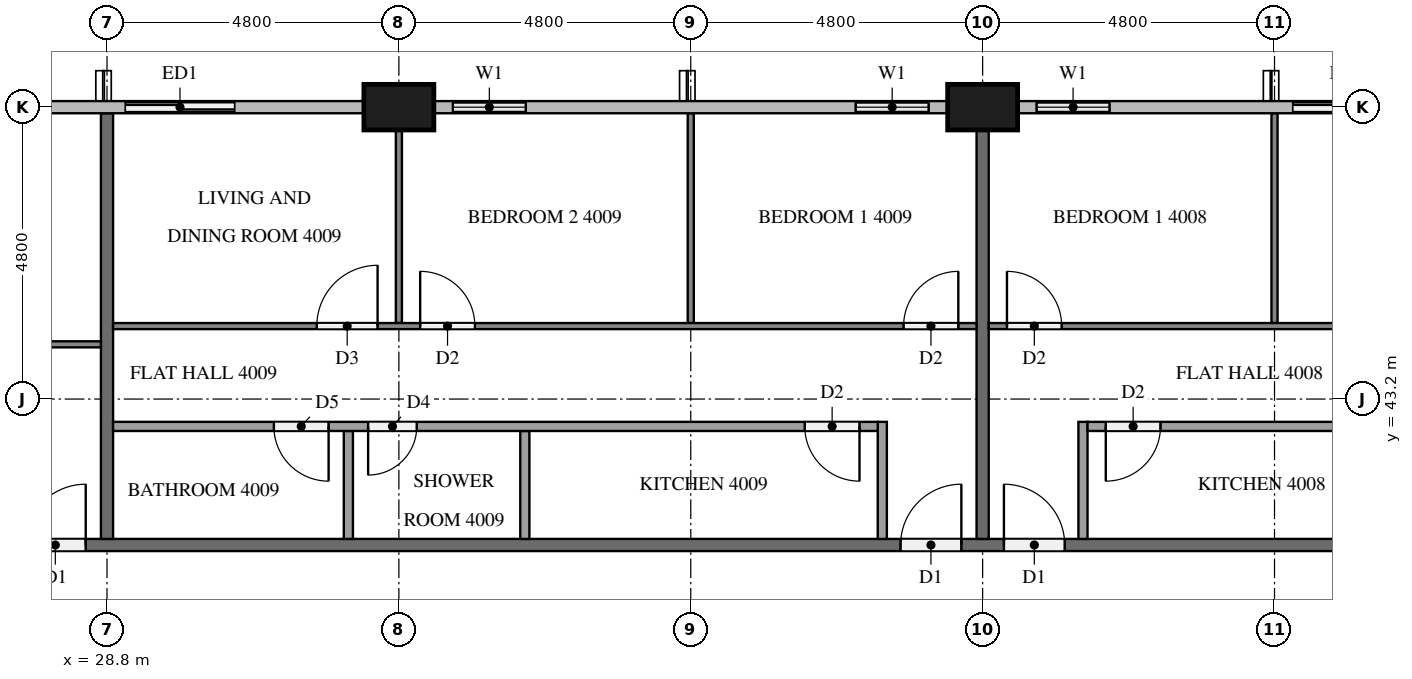
"""IFC4 building model, lengths in metres.
Left out: names, types, materials, properties, quantities, classifications, styles, units other than length and angle.
Written with IfcOpenShell. Run it as: python <this file> out.ifc"""

import sys

from ifc_helpers import new_model, si_unit, direction, frame, frame_2d, origin, origin_2d, place, context, subcontext, project, spatial, rectangle, extrude, element, fill, save


model = new_model("IFC4")
c1 = context("Model", 3, precision=1e-05, world=origin(), true_north=direction((0.0, 1.0)))
c2 = subcontext(c1, "Body", "Model", "MODEL_VIEW")
j1 = project(units=[si_unit("LENGTHUNIT", "METRE"), si_unit("PLANEANGLEUNIT", "RADIAN")], contexts=[c1])
p1 = place(None, origin())
s1 = spatial("IfcSite", under=j1, at=p1, CompositionType="ELEMENT")
p2 = place(p1, origin())
s2 = spatial("IfcBuilding", under=s1, at=p2, CompositionType="ELEMENT")
p3 = place(p2, frame((0.0, 0.0, 156.0)))
s3 = spatial("IfcBuildingStorey", under=s2, at=p3, CompositionType="ELEMENT", Elevation=156.0)
for number, where, z_axis, x_axis in (
    (1, (43.2, 48.0, 0.0), (0.0, 0.0, 1.0), (1.0, 0.0, 0.0)),
    (2, (33.6, 48.0, 0.0), (0.0, 0.0, 1.0), (1.0, 0.0, 0.0)),
):
    element("IfcColumn", number, at=place(p3, frame(where, z_axis=z_axis, x_axis=x_axis)), inside=s3, PredefinedType="COLUMN", context=c2, shape_type="SweptSolid", body=[
        extrude(rectangle(XDim=1.15, YDim=0.75, at=origin_2d()), origin(), (0.0, 0.0, 1.0), 3.2),
    ])
p4 = place(p3, frame((50.4, 48.0, 0.0), z_axis=(0.0, 0.0, 1.0), x_axis=(-1.0, 0.0, 0.0)))
e3 = element("IfcWall", 3, at=p4, inside=s3, PredefinedType="SOLIDWALL", context=c2, shape_type="SweptSolid", body=[
    extrude(rectangle(XDim=2.4, YDim=0.15, at=frame_2d((1.2, 0.0))), origin(), (0.0, 0.0, 1.0), 3.2),
])
p5 = place(p4, frame((0.3, 0.0, 0.0)))
e4 = element("IfcOpeningElement", 4, at=p5, cuts=e3, PredefinedType="OPENING", context=c2, shape_type="SweptSolid", body=[
    extrude(rectangle(XDim=1.8, YDim=2.4, at=frame_2d((0.9, 1.2))), frame((0.0, 0.085, 0.0), z_axis=(0.0, -1.0, 0.0), x_axis=(1.0, 0.0, 0.0)), (0.0, 0.0, 1.0), 0.17),
])
p6 = place(p3, frame((45.6, 48.0, 0.0), z_axis=(0.0, 0.0, 1.0), x_axis=(-1.0, 0.0, 0.0)))
e5 = element("IfcWall", 5, at=p6, inside=s3, PredefinedType="SOLIDWALL", context=c2, shape_type="SweptSolid", body=[
    extrude(rectangle(XDim=1.825, YDim=0.15, at=frame_2d((0.913, 0.0))), origin(), (0.0, 0.0, 1.0), 3.2),
])
p7 = place(p6, frame((0.312, 0.0, 0.9)))
e6 = element("IfcOpeningElement", 6, at=p7, cuts=e5, PredefinedType="OPENING", context=c2, shape_type="SweptSolid", body=[
    extrude(rectangle(XDim=1.2, YDim=1.4, at=frame_2d((0.6, 0.7))), frame((0.0, 0.085, 0.0), z_axis=(0.0, -1.0, 0.0), x_axis=(1.0, 0.0, 0.0)), (0.0, 0.0, 1.0), 0.17),
])
p8 = place(p3, frame((42.625, 48.0, 0.0), z_axis=(0.0, 0.0, 1.0), x_axis=(-1.0, 0.0, 0.0)))
e7 = element("IfcWall", 7, at=p8, inside=s3, PredefinedType="SOLIDWALL", context=c2, shape_type="SweptSolid", body=[
    extrude(rectangle(XDim=1.825, YDim=0.15, at=frame_2d((0.913, 0.0))), origin(), (0.0, 0.0, 1.0), 3.2),
])
p9 = place(p8, frame((0.312, 0.0, 0.9)))
e8 = element("IfcOpeningElement", 8, at=p9, cuts=e7, PredefinedType="OPENING", context=c2, shape_type="SweptSolid", body=[
    extrude(rectangle(XDim=1.2, YDim=1.4, at=frame_2d((0.6, 0.7))), frame((0.0, 0.085, 0.0), z_axis=(0.0, -1.0, 0.0), x_axis=(1.0, 0.0, 0.0)), (0.0, 0.0, 1.0), 0.17),
])
p10 = place(p3, frame((36.0, 48.0, 0.0), z_axis=(0.0, 0.0, 1.0), x_axis=(-1.0, 0.0, 0.0)))
e9 = element("IfcWall", 9, at=p10, inside=s3, PredefinedType="SOLIDWALL", context=c2, shape_type="SweptSolid", body=[
    extrude(rectangle(XDim=1.825, YDim=0.15, at=frame_2d((0.913, 0.0))), origin(), (0.0, 0.0, 1.0), 3.2),
])
p11 = place(p10, frame((0.312, 0.0, 0.9)))
e10 = element("IfcOpeningElement", 10, at=p11, cuts=e9, PredefinedType="OPENING", context=c2, shape_type="SweptSolid", body=[
    extrude(rectangle(XDim=1.2, YDim=1.4, at=frame_2d((0.6, 0.7))), frame((0.0, 0.085, 0.0), z_axis=(0.0, -1.0, 0.0), x_axis=(1.0, 0.0, 0.0)), (0.0, 0.0, 1.0), 0.17),
])
p12 = place(p3, frame((31.2, 48.0, 0.0), z_axis=(0.0, 0.0, 1.0), x_axis=(-1.0, 0.0, 0.0)))
e11 = element("IfcWall", 11, at=p12, inside=s3, PredefinedType="SOLIDWALL", context=c2, shape_type="SweptSolid", body=[
    extrude(rectangle(XDim=2.4, YDim=0.15, at=frame_2d((1.2, 0.0))), origin(), (0.0, 0.0, 1.0), 3.2),
])
p13 = place(p12, frame((0.3, 0.0, 0.0)))
e12 = element("IfcOpeningElement", 12, at=p13, cuts=e11, PredefinedType="OPENING", context=c2, shape_type="SweptSolid", body=[
    extrude(rectangle(XDim=1.8, YDim=2.4, at=frame_2d((0.9, 1.2))), frame((0.0, 0.085, 0.0), z_axis=(0.0, -1.0, 0.0), x_axis=(1.0, 0.0, 0.0)), (0.0, 0.0, 1.0), 0.17),
])
p14 = place(p3, frame((11.9, 40.8, 0.0), z_axis=(0.0, 0.0, 1.0), x_axis=(1.0, 0.0, 0.0)))
e13 = element("IfcWall", 13, at=p14, inside=s3, PredefinedType="PARTITIONING", context=c2, shape_type="SweptSolid", body=[
    extrude(rectangle(XDim=38.6, YDim=0.2, at=frame_2d((19.3, 0.0))), origin(), (0.0, 0.0, 1.0), 3.2),
])
p15 = place(p14, frame((31.65, 0.0, 0.0)))
e14 = element("IfcOpeningElement", 14, at=p15, cuts=e13, PredefinedType="OPENING", context=c2, shape_type="SweptSolid", body=[
    extrude(rectangle(XDim=1.0, YDim=2.1, at=frame_2d((0.5, 1.05))), frame((0.0, 0.11, 0.0), z_axis=(0.0, -1.0, 0.0), x_axis=(1.0, 0.0, 0.0)), (0.0, 0.0, 1.0), 0.22),
])
p16 = place(p14, frame((29.95, 0.0, 0.0)))
e15 = element("IfcOpeningElement", 15, at=p16, cuts=e13, PredefinedType="OPENING", context=c2, shape_type="SweptSolid", body=[
    extrude(rectangle(XDim=1.0, YDim=2.1, at=frame_2d((0.5, 1.05))), frame((0.0, 0.11, 0.0), z_axis=(0.0, -1.0, 0.0), x_axis=(1.0, 0.0, 0.0)), (0.0, 0.0, 1.0), 0.22),
])
p17 = place(p14, frame((15.55, 0.0, 0.0)))
e16 = element("IfcOpeningElement", 16, at=p17, cuts=e13, PredefinedType="OPENING", context=c2, shape_type="SweptSolid", body=[
    extrude(rectangle(XDim=1.0, YDim=2.1, at=frame_2d((0.5, 1.05))), frame((0.0, 0.11, 0.0), z_axis=(0.0, -1.0, 0.0), x_axis=(1.0, 0.0, 0.0)), (0.0, 0.0, 1.0), 0.22),
])
p18 = place(p14, frame((1.15, 0.0, 0.0)))
e17 = element("IfcOpeningElement", 17, at=p18, cuts=e13, PredefinedType="OPENING", context=c2, shape_type="SweptSolid", body=[
    extrude(rectangle(XDim=1.0, YDim=2.1, at=frame_2d((0.5, 1.05))), frame((0.0, 0.11, 0.0), z_axis=(0.0, -1.0, 0.0), x_axis=(1.0, 0.0, 0.0)), (0.0, 0.0, 1.0), 0.22),
])
p19 = place(p3, frame((43.2, 47.625, 0.0), z_axis=(0.0, 0.0, 1.0), x_axis=(0.0, -1.0, 0.0)))
e18 = element("IfcWall", 18, at=p19, inside=s3, PredefinedType="PARTITIONING", context=c2, shape_type="SweptSolid", body=[
    extrude(rectangle(XDim=6.725, YDim=0.2, at=frame_2d((3.363, 0.0))), origin(), (0.0, 0.0, 1.0), 3.2),
])
p20 = place(p3, frame((28.8, 47.9, 0.0), z_axis=(0.0, 0.0, 1.0), x_axis=(0.0, -1.0, 0.0)))
e19 = element("IfcWall", 19, at=p20, inside=s3, PredefinedType="PARTITIONING", context=c2, shape_type="SweptSolid", body=[
    extrude(rectangle(XDim=7.0, YDim=0.2, at=frame_2d((3.5, 0.0))), origin(), (0.0, 0.0, 1.0), 3.2),
])
p21 = place(p3, frame((48.0, 44.45, 0.0), z_axis=(0.0, 0.0, 1.0), x_axis=(0.0, 1.0, 0.0)))
e20 = element("IfcWall", 20, at=p21, inside=s3, PredefinedType="PARTITIONING", context=c2, shape_type="SweptSolid", body=[
    extrude(rectangle(XDim=3.45, YDim=0.1, at=frame_2d((1.725, 0.0))), origin(), (0.0, 0.0, 1.0), 3.2),
])
p22 = place(p3, frame((43.3, 44.4, 0.0), z_axis=(0.0, 0.0, 1.0), x_axis=(1.0, 0.0, 0.0)))
e21 = element("IfcWall", 21, at=p22, inside=s3, PredefinedType="PARTITIONING", context=c2, shape_type="SweptSolid", body=[
    extrude(rectangle(XDim=13.878, YDim=0.1, at=frame_2d((6.939, 0.0))), origin(), (0.0, 0.0, 1.0), 3.2),
])
p23 = place(p22, frame((0.3, 0.0, 0.0)))
e22 = element("IfcOpeningElement", 22, at=p23, cuts=e21, PredefinedType="OPENING", context=c2, shape_type="SweptSolid", body=[
    extrude(rectangle(XDim=0.9, YDim=2.1, at=frame_2d((0.45, 1.05))), frame((0.0, 0.06, 0.0), z_axis=(0.0, -1.0, 0.0), x_axis=(1.0, 0.0, 0.0)), (0.0, 0.0, 1.0), 0.12),
])
p24 = place(p22, frame((8.15, 0.0, 0.0)))
e23 = element("IfcOpeningElement", 23, at=p24, cuts=e21, PredefinedType="OPENING", context=c2, shape_type="SweptSolid", body=[
    extrude(rectangle(XDim=1.0, YDim=2.1, at=frame_2d((0.5, 1.05))), frame((0.0, 0.06, 0.0), z_axis=(0.0, -1.0, 0.0), x_axis=(1.0, 0.0, 0.0)), (0.0, 0.0, 1.0), 0.12),
])
p25 = place(p22, frame((9.85, 0.0, 0.0)))
e24 = element("IfcOpeningElement", 24, at=p25, cuts=e21, PredefinedType="OPENING", context=c2, shape_type="SweptSolid", body=[
    extrude(rectangle(XDim=0.9, YDim=2.1, at=frame_2d((0.45, 1.05))), frame((0.0, 0.06, 0.0), z_axis=(0.0, -1.0, 0.0), x_axis=(1.0, 0.0, 0.0)), (0.0, 0.0, 1.0), 0.12),
])
p26 = place(p3, frame((44.85, 40.9, 0.0), z_axis=(0.0, 0.0, 1.0), x_axis=(0.0, 1.0, 0.0)))
e25 = element("IfcWall", 25, at=p26, inside=s3, PredefinedType="PARTITIONING", context=c2, shape_type="SweptSolid", body=[
    extrude(rectangle(XDim=1.925, YDim=0.15, at=frame_2d((0.962, 0.0))), origin(), (0.0, 0.0, 1.0), 3.2),
])
p27 = place(p3, frame((57.075, 42.75, 0.0), z_axis=(0.0, 0.0, 1.0), x_axis=(-1.0, 0.0, 0.0)))
e26 = element("IfcWall", 26, at=p27, inside=s3, PredefinedType="PARTITIONING", context=c2, shape_type="SweptSolid", body=[
    extrude(rectangle(XDim=12.15, YDim=0.15, at=frame_2d((6.075, 0.0))), origin(), (0.0, 0.0, 1.0), 3.2),
])
p28 = place(p27, frame((10.95, 0.0, 0.0)))
e27 = element("IfcOpeningElement", 27, at=p28, cuts=e26, PredefinedType="OPENING", context=c2, shape_type="SweptSolid", body=[
    extrude(rectangle(XDim=0.9, YDim=2.1, at=frame_2d((0.45, 1.05))), frame((0.0, 0.085, 0.0), z_axis=(0.0, -1.0, 0.0), x_axis=(1.0, 0.0, 0.0)), (0.0, 0.0, 1.0), 0.17),
])
p29 = place(p27, frame((3.769, 0.0, 0.0)))
e28 = element("IfcOpeningElement", 28, at=p29, cuts=e26, PredefinedType="OPENING", context=c2, shape_type="SweptSolid", body=[
    extrude(rectangle(XDim=0.8, YDim=2.1, at=frame_2d((0.4, 1.05))), frame((0.0, 0.085, 0.0), z_axis=(0.0, -1.0, 0.0), x_axis=(1.0, 0.0, 0.0)), (0.0, 0.0, 1.0), 0.17),
])
p30 = place(p27, frame((2.219, 0.0, 0.0)))
e29 = element("IfcOpeningElement", 29, at=p30, cuts=e26, PredefinedType="OPENING", context=c2, shape_type="SweptSolid", body=[
    extrude(rectangle(XDim=0.9, YDim=2.1, at=frame_2d((0.45, 1.05))), frame((0.0, 0.085, 0.0), z_axis=(0.0, -1.0, 0.0), x_axis=(1.0, 0.0, 0.0)), (0.0, 0.0, 1.0), 0.17),
])
p31 = place(p3, frame((38.4, 44.45, 0.0), z_axis=(0.0, 0.0, 1.0), x_axis=(0.0, 1.0, 0.0)))
e30 = element("IfcWall", 30, at=p31, inside=s3, PredefinedType="PARTITIONING", context=c2, shape_type="SweptSolid", body=[
    extrude(rectangle(XDim=3.45, YDim=0.1, at=frame_2d((1.725, 0.0))), origin(), (0.0, 0.0, 1.0), 3.2),
])
p32 = place(p3, frame((33.6, 44.45, 0.0), z_axis=(0.0, 0.0, 1.0), x_axis=(0.0, 1.0, 0.0)))
e31 = element("IfcWall", 31, at=p32, inside=s3, PredefinedType="PARTITIONING", context=c2, shape_type="SweptSolid", body=[
    extrude(rectangle(XDim=3.175, YDim=0.1, at=frame_2d((1.587, 0.0))), origin(), (0.0, 0.0, 1.0), 3.2),
])
p33 = place(p3, frame((28.9, 44.4, 0.0), z_axis=(0.0, 0.0, 1.0), x_axis=(1.0, 0.0, 0.0)))
e32 = element("IfcWall", 32, at=p33, inside=s3, PredefinedType="PARTITIONING", context=c2, shape_type="SweptSolid", body=[
    extrude(rectangle(XDim=14.2, YDim=0.1, at=frame_2d((7.1, 0.0))), origin(), (0.0, 0.0, 1.0), 3.2),
])
p34 = place(p33, frame((13.0, 0.0, 0.0)))
e33 = element("IfcOpeningElement", 33, at=p34, cuts=e32, PredefinedType="OPENING", context=c2, shape_type="SweptSolid", body=[
    extrude(rectangle(XDim=0.9, YDim=2.1, at=frame_2d((0.45, 1.05))), frame((0.0, 0.06, 0.0), z_axis=(0.0, -1.0, 0.0), x_axis=(1.0, 0.0, 0.0)), (0.0, 0.0, 1.0), 0.12),
])
p35 = place(p33, frame((5.05, 0.0, 0.0)))
e34 = element("IfcOpeningElement", 34, at=p35, cuts=e32, PredefinedType="OPENING", context=c2, shape_type="SweptSolid", body=[
    extrude(rectangle(XDim=0.9, YDim=2.1, at=frame_2d((0.45, 1.05))), frame((0.0, 0.06, 0.0), z_axis=(0.0, -1.0, 0.0), x_axis=(1.0, 0.0, 0.0)), (0.0, 0.0, 1.0), 0.12),
])
p36 = place(p33, frame((3.35, 0.0, 0.0)))
e35 = element("IfcOpeningElement", 35, at=p36, cuts=e32, PredefinedType="OPENING", context=c2, shape_type="SweptSolid", body=[
    extrude(rectangle(XDim=1.0, YDim=2.1, at=frame_2d((0.5, 1.05))), frame((0.0, 0.06, 0.0), z_axis=(0.0, -1.0, 0.0), x_axis=(1.0, 0.0, 0.0)), (0.0, 0.0, 1.0), 0.12),
])
for number, where, z_axis, x_axis in (
    (36, (35.671, 40.9, 0.0), (0.0, 0.0, 1.0), (0.0, 1.0, 0.0)),
    (37, (32.769, 40.9, 0.0), (0.0, 0.0, 1.0), (0.0, 1.0, 0.0)),
):
    element("IfcWall", number, at=place(p3, frame(where, z_axis=z_axis, x_axis=x_axis)), inside=s3, PredefinedType="PARTITIONING", context=c2, shape_type="SweptSolid", body=[
        extrude(rectangle(XDim=1.775, YDim=0.15, at=frame_2d((0.888, 0.0))), origin(), (0.0, 0.0, 1.0), 3.2),
    ])
p37 = place(p3, frame((41.55, 40.9, 0.0), z_axis=(0.0, 0.0, 1.0), x_axis=(0.0, 1.0, 0.0)))
e38 = element("IfcWall", 38, at=p37, inside=s3, PredefinedType="PARTITIONING", context=c2, shape_type="SweptSolid", body=[
    extrude(rectangle(XDim=1.925, YDim=0.15, at=frame_2d((0.962, 0.0))), origin(), (0.0, 0.0, 1.0), 3.2),
])
p38 = place(p3, frame((41.475, 42.75, 0.0), z_axis=(0.0, 0.0, 1.0), x_axis=(-1.0, 0.0, 0.0)))
e39 = element("IfcWall", 39, at=p38, inside=s3, PredefinedType="PARTITIONING", context=c2, shape_type="SweptSolid", body=[
    extrude(rectangle(XDim=12.575, YDim=0.15, at=frame_2d((6.288, 0.0))), origin(), (0.0, 0.0, 1.0), 3.2),
])
p39 = place(p38, frame((0.3, 0.0, 0.0)))
e40 = element("IfcOpeningElement", 40, at=p39, cuts=e39, PredefinedType="OPENING", context=c2, shape_type="SweptSolid", body=[
    extrude(rectangle(XDim=0.9, YDim=2.1, at=frame_2d((0.45, 1.05))), frame((0.0, 0.085, 0.0), z_axis=(0.0, -1.0, 0.0), x_axis=(1.0, 0.0, 0.0)), (0.0, 0.0, 1.0), 0.17),
])
p40 = place(p38, frame((7.581, 0.0, 0.0)))
e41 = element("IfcOpeningElement", 41, at=p40, cuts=e39, PredefinedType="OPENING", context=c2, shape_type="SweptSolid", body=[
    extrude(rectangle(XDim=0.8, YDim=2.1, at=frame_2d((0.4, 1.05))), frame((0.0, 0.085, 0.0), z_axis=(0.0, -1.0, 0.0), x_axis=(1.0, 0.0, 0.0)), (0.0, 0.0, 1.0), 0.17),
])
p41 = place(p38, frame((9.031, 0.0, 0.0)))
e42 = element("IfcOpeningElement", 42, at=p41, cuts=e39, PredefinedType="OPENING", context=c2, shape_type="SweptSolid", body=[
    extrude(rectangle(XDim=0.9, YDim=2.1, at=frame_2d((0.45, 1.05))), frame((0.0, 0.085, 0.0), z_axis=(0.0, -1.0, 0.0), x_axis=(1.0, 0.0, 0.0)), (0.0, 0.0, 1.0), 0.17),
])
p42 = place(p3, frame((14.5, 44.1, 0.0), z_axis=(0.0, 0.0, 1.0), x_axis=(1.0, 0.0, 0.0)))
e43 = element("IfcWall", 43, at=p42, inside=s3, PredefinedType="PARTITIONING", context=c2, shape_type="SweptSolid", body=[
    extrude(rectangle(XDim=14.2, YDim=0.1, at=frame_2d((7.1, 0.0))), origin(), (0.0, 0.0, 1.0), 3.2),
])
p43 = place(p42, frame((9.85, 0.0, 0.0)))
e44 = element("IfcOpeningElement", 44, at=p43, cuts=e43, PredefinedType="OPENING", context=c2, shape_type="SweptSolid", body=[
    extrude(rectangle(XDim=0.9, YDim=2.1, at=frame_2d((0.45, 1.05))), frame((0.0, 0.06, 0.0), z_axis=(0.0, -1.0, 0.0), x_axis=(1.0, 0.0, 0.0)), (0.0, 0.0, 1.0), 0.12),
])
p44 = place(p42, frame((8.25, 0.0, 0.0)))
e45 = element("IfcOpeningElement", 45, at=p44, cuts=e43, PredefinedType="OPENING", context=c2, shape_type="SweptSolid", body=[
    extrude(rectangle(XDim=0.9, YDim=2.1, at=frame_2d((0.45, 1.05))), frame((0.0, 0.06, 0.0), z_axis=(0.0, -1.0, 0.0), x_axis=(1.0, 0.0, 0.0)), (0.0, 0.0, 1.0), 0.12),
])
p45 = place(p42, frame((0.3, 0.0, 0.0)))
e46 = element("IfcOpeningElement", 46, at=p45, cuts=e43, PredefinedType="OPENING", context=c2, shape_type="SweptSolid", body=[
    extrude(rectangle(XDim=1.0, YDim=2.1, at=frame_2d((0.5, 1.05))), frame((0.0, 0.06, 0.0), z_axis=(0.0, -1.0, 0.0), x_axis=(1.0, 0.0, 0.0)), (0.0, 0.0, 1.0), 0.12),
])
p46 = place(p5, origin())
e47 = element("IfcDoor", 47, at=p46, inside=s3, OperationType="SLIDING_TO_RIGHT", PredefinedType="DOOR", context=c2, shape_type="SweptSolid", body=[
    extrude(rectangle(XDim=1.8, YDim=2.4, at=frame_2d((0.9, 1.2))), frame((0.0, 0.025, 0.0), z_axis=(0.0, -1.0, 0.0), x_axis=(1.0, 0.0, 0.0)), (0.0, 0.0, 1.0), 0.05),
])
fill(e4, e47)
p47 = place(p7, origin())
e48 = element("IfcWindow", 48, at=p47, inside=s3, PartitioningType="SINGLE_PANEL", PredefinedType="WINDOW", context=c2, shape_type="SweptSolid", body=[
    extrude(rectangle(XDim=1.2, YDim=1.4, at=frame_2d((0.6, 0.7))), frame((0.0, 0.03, 0.0), z_axis=(0.0, -1.0, 0.0), x_axis=(1.0, 0.0, 0.0)), (0.0, 0.0, 1.0), 0.06),
])
fill(e6, e48)
p48 = place(p9, origin())
e49 = element("IfcWindow", 49, at=p48, inside=s3, PartitioningType="SINGLE_PANEL", PredefinedType="WINDOW", context=c2, shape_type="SweptSolid", body=[
    extrude(rectangle(XDim=1.2, YDim=1.4, at=frame_2d((0.6, 0.7))), frame((0.0, 0.03, 0.0), z_axis=(0.0, -1.0, 0.0), x_axis=(1.0, 0.0, 0.0)), (0.0, 0.0, 1.0), 0.06),
])
fill(e8, e49)
p49 = place(p11, origin())
e50 = element("IfcWindow", 50, at=p49, inside=s3, PartitioningType="SINGLE_PANEL", PredefinedType="WINDOW", context=c2, shape_type="SweptSolid", body=[
    extrude(rectangle(XDim=1.2, YDim=1.4, at=frame_2d((0.6, 0.7))), frame((0.0, 0.03, 0.0), z_axis=(0.0, -1.0, 0.0), x_axis=(1.0, 0.0, 0.0)), (0.0, 0.0, 1.0), 0.06),
])
fill(e10, e50)
p50 = place(p13, origin())
e51 = element("IfcDoor", 51, at=p50, inside=s3, OperationType="SLIDING_TO_LEFT", PredefinedType="DOOR", context=c2, shape_type="SweptSolid", body=[
    extrude(rectangle(XDim=1.8, YDim=2.4, at=frame_2d((0.9, 1.2))), frame((0.0, 0.025, 0.0), z_axis=(0.0, -1.0, 0.0), x_axis=(1.0, 0.0, 0.0)), (0.0, 0.0, 1.0), 0.05),
])
fill(e12, e51)
p51 = place(p15, origin())
e52 = element("IfcDoor", 52, at=p51, inside=s3, OperationType="SINGLE_SWING_LEFT", PredefinedType="DOOR", context=c2, shape_type="SweptSolid", body=[
    extrude(rectangle(XDim=1.0, YDim=2.1, at=frame_2d((0.5, 1.05))), frame((0.0, 0.025, 0.0), z_axis=(0.0, -1.0, 0.0), x_axis=(1.0, 0.0, 0.0)), (0.0, 0.0, 1.0), 0.05),
])
fill(e14, e52)
p52 = place(p16, origin())
e53 = element("IfcDoor", 53, at=p52, inside=s3, OperationType="SINGLE_SWING_RIGHT", PredefinedType="DOOR", context=c2, shape_type="SweptSolid", body=[
    extrude(rectangle(XDim=1.0, YDim=2.1, at=frame_2d((0.5, 1.05))), frame((0.0, 0.025, 0.0), z_axis=(0.0, -1.0, 0.0), x_axis=(1.0, 0.0, 0.0)), (0.0, 0.0, 1.0), 0.05),
])
fill(e15, e53)
p53 = place(p17, origin())
e54 = element("IfcDoor", 54, at=p53, inside=s3, OperationType="SINGLE_SWING_RIGHT", PredefinedType="DOOR", context=c2, shape_type="SweptSolid", body=[
    extrude(rectangle(XDim=1.0, YDim=2.1, at=frame_2d((0.5, 1.05))), frame((0.0, 0.025, 0.0), z_axis=(0.0, -1.0, 0.0), x_axis=(1.0, 0.0, 0.0)), (0.0, 0.0, 1.0), 0.05),
])
fill(e16, e54)
p54 = place(p23, origin())
e55 = element("IfcDoor", 55, at=p54, inside=s3, OperationType="SINGLE_SWING_LEFT", PredefinedType="DOOR", context=c2, shape_type="SweptSolid", body=[
    extrude(rectangle(XDim=0.9, YDim=2.1, at=frame_2d((0.45, 1.05))), frame((0.0, 0.025, 0.0), z_axis=(0.0, -1.0, 0.0), x_axis=(1.0, 0.0, 0.0)), (0.0, 0.0, 1.0), 0.05),
])
fill(e22, e55)
p55 = place(p28, origin())
e56 = element("IfcDoor", 56, at=p55, inside=s3, OperationType="SINGLE_SWING_RIGHT", PredefinedType="DOOR", context=c2, shape_type="SweptSolid", body=[
    extrude(rectangle(XDim=0.9, YDim=2.1, at=frame_2d((0.45, 1.05))), frame((0.0, 0.025, 0.0), z_axis=(0.0, -1.0, 0.0), x_axis=(1.0, 0.0, 0.0)), (0.0, 0.0, 1.0), 0.05),
])
fill(e27, e56)
p56 = place(p34, origin())
e57 = element("IfcDoor", 57, at=p56, inside=s3, OperationType="SINGLE_SWING_RIGHT", PredefinedType="DOOR", context=c2, shape_type="SweptSolid", body=[
    extrude(rectangle(XDim=0.9, YDim=2.1, at=frame_2d((0.45, 1.05))), frame((0.0, 0.025, 0.0), z_axis=(0.0, -1.0, 0.0), x_axis=(1.0, 0.0, 0.0)), (0.0, 0.0, 1.0), 0.05),
])
fill(e33, e57)
p57 = place(p35, origin())
e58 = element("IfcDoor", 58, at=p57, inside=s3, OperationType="SINGLE_SWING_LEFT", PredefinedType="DOOR", context=c2, shape_type="SweptSolid", body=[
    extrude(rectangle(XDim=0.9, YDim=2.1, at=frame_2d((0.45, 1.05))), frame((0.0, 0.025, 0.0), z_axis=(0.0, -1.0, 0.0), x_axis=(1.0, 0.0, 0.0)), (0.0, 0.0, 1.0), 0.05),
])
fill(e34, e58)
p58 = place(p36, origin())
e59 = element("IfcDoor", 59, at=p58, inside=s3, OperationType="SINGLE_SWING_RIGHT", PredefinedType="DOOR", context=c2, shape_type="SweptSolid", body=[
    extrude(rectangle(XDim=1.0, YDim=2.1, at=frame_2d((0.5, 1.05))), frame((0.0, 0.025, 0.0), z_axis=(0.0, -1.0, 0.0), x_axis=(1.0, 0.0, 0.0)), (0.0, 0.0, 1.0), 0.05),
])
fill(e35, e59)
p59 = place(p39, origin())
e60 = element("IfcDoor", 60, at=p59, inside=s3, OperationType="SINGLE_SWING_LEFT", PredefinedType="DOOR", context=c2, shape_type="SweptSolid", body=[
    extrude(rectangle(XDim=0.9, YDim=2.1, at=frame_2d((0.45, 1.05))), frame((0.0, 0.025, 0.0), z_axis=(0.0, -1.0, 0.0), x_axis=(1.0, 0.0, 0.0)), (0.0, 0.0, 1.0), 0.05),
])
fill(e40, e60)
p60 = place(p40, origin())
e61 = element("IfcDoor", 61, at=p60, inside=s3, OperationType="SINGLE_SWING_RIGHT", PredefinedType="DOOR", context=c2, shape_type="SweptSolid", body=[
    extrude(rectangle(XDim=0.8, YDim=2.1, at=frame_2d((0.4, 1.05))), frame((0.0, 0.025, 0.0), z_axis=(0.0, -1.0, 0.0), x_axis=(1.0, 0.0, 0.0)), (0.0, 0.0, 1.0), 0.05),
])
fill(e41, e61)
p61 = place(p41, origin())
e62 = element("IfcDoor", 62, at=p61, inside=s3, OperationType="SINGLE_SWING_LEFT", PredefinedType="DOOR", context=c2, shape_type="SweptSolid", body=[
    extrude(rectangle(XDim=0.9, YDim=2.1, at=frame_2d((0.45, 1.05))), frame((0.0, 0.025, 0.0), z_axis=(0.0, -1.0, 0.0), x_axis=(1.0, 0.0, 0.0)), (0.0, 0.0, 1.0), 0.05),
])
fill(e42, e62)
save(model, sys.argv[1])
